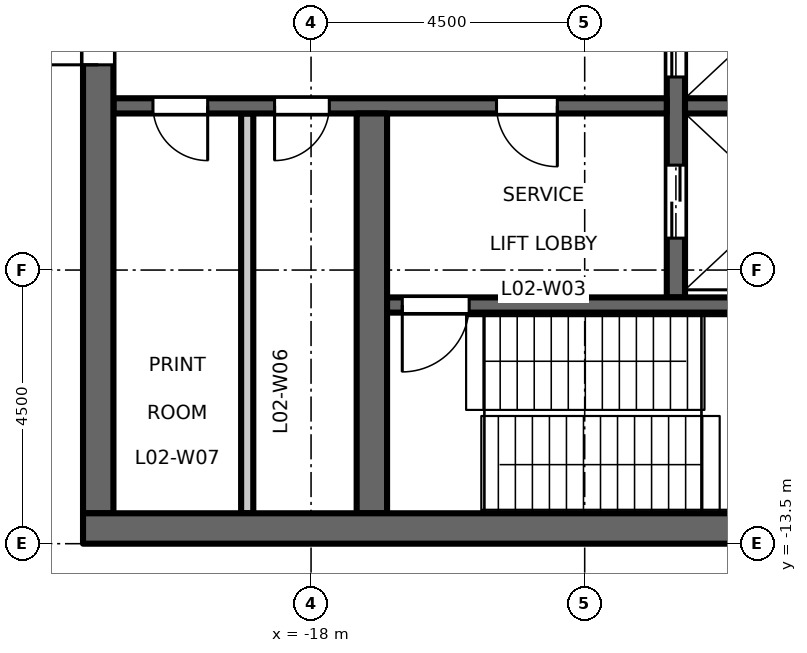
"""IFC4 building model, lengths in metres.
Left out: names, types, materials, properties, quantities, classifications, styles, units other than length and angle.
Written with IfcOpenShell. Run it as: python <this file> out.ifc"""

import sys

from ifc_helpers import new_model, si_unit, direction, frame, frame_2d, origin, place, context, subcontext, project, spatial, rectangle, extrude, element, fill, save


model = new_model("IFC4")
c1 = context("Model", 3, precision=1e-05, world=origin(), true_north=direction((0.0, 1.0)))
c2 = subcontext(c1, "Body", "Model", "MODEL_VIEW")
j1 = project(units=[si_unit("LENGTHUNIT", "METRE"), si_unit("PLANEANGLEUNIT", "RADIAN")], contexts=[c1])
p1 = place(None, origin())
s1 = spatial("IfcSite", under=j1, at=p1, CompositionType="ELEMENT")
p2 = place(p1, origin())
s2 = spatial("IfcBuilding", under=s1, at=p2, CompositionType="ELEMENT")
p3 = place(p2, frame((0.0, 0.0, 12.2)))
s3 = spatial("IfcBuildingStorey", under=s2, at=p3, CompositionType="ELEMENT", Elevation=12.2)
p4 = place(p3, frame((-12.0, -9.45, 0.0), z_axis=(0.0, 0.0, 1.0), x_axis=(0.0, 1.0, 0.0)))
e1 = element("IfcWall", 1, at=p4, inside=s3, PredefinedType="SHEAR", context=c2, shape_type="SweptSolid", body=[
    extrude(rectangle(XDim=18.9, YDim=0.3, at=frame_2d((9.45, 0.0))), origin(), (0.0, 0.0, 1.0), 4.85),
])
p5 = place(p4, frame((3.625, 0.0, 0.0)))
e2 = element("IfcOpeningElement", 2, at=p5, cuts=e1, PredefinedType="OPENING", context=c2, shape_type="SweptSolid", body=[
    extrude(rectangle(XDim=1.1, YDim=2.1, at=frame_2d((0.55, 1.05))), frame((0.0, 0.16, 0.0), z_axis=(0.0, -1.0, 0.0), x_axis=(1.0, 0.0, 0.0)), (0.0, 0.0, 1.0), 0.32),
])
p6 = place(p4, frame((6.775, 0.0, 0.0)))
e3 = element("IfcOpeningElement", 3, at=p6, cuts=e1, PredefinedType="OPENING", context=c2, shape_type="SweptSolid", body=[
    extrude(rectangle(XDim=1.1, YDim=2.1, at=frame_2d((0.55, 1.05))), frame((0.0, 0.16, 0.0), z_axis=(0.0, -1.0, 0.0), x_axis=(1.0, 0.0, 0.0)), (0.0, 0.0, 1.0), 0.32),
])
p7 = place(p4, frame((9.925, 0.0, 0.0)))
e4 = element("IfcOpeningElement", 4, at=p7, cuts=e1, PredefinedType="OPENING", context=c2, shape_type="SweptSolid", body=[
    extrude(rectangle(XDim=1.1, YDim=2.1, at=frame_2d((0.55, 1.05))), frame((0.0, 0.16, 0.0), z_axis=(0.0, -1.0, 0.0), x_axis=(1.0, 0.0, 0.0)), (0.0, 0.0, 1.0), 0.32),
])
p8 = place(p4, frame((13.075, 0.0, 0.0)))
e5 = element("IfcOpeningElement", 5, at=p8, cuts=e1, PredefinedType="OPENING", context=c2, shape_type="SweptSolid", body=[
    extrude(rectangle(XDim=1.1, YDim=2.1, at=frame_2d((0.55, 1.05))), frame((0.0, 0.16, 0.0), z_axis=(0.0, -1.0, 0.0), x_axis=(1.0, 0.0, 0.0)), (0.0, 0.0, 1.0), 0.32),
])
p9 = place(p4, frame((16.725, 0.0, 0.0)))
e6 = element("IfcOpeningElement", 6, at=p9, cuts=e1, PredefinedType="OPENING", context=c2, shape_type="SweptSolid", body=[
    extrude(rectangle(XDim=1.2, YDim=2.1, at=frame_2d((0.6, 1.05))), frame((0.0, 0.16, 0.0), z_axis=(0.0, -1.0, 0.0), x_axis=(1.0, 0.0, 0.0)), (0.0, 0.0, 1.0), 0.32),
])
p10 = place(p4, frame((0.975, 0.0, 0.0)))
e7 = element("IfcOpeningElement", 7, at=p10, cuts=e1, PredefinedType="OPENING", context=c2, shape_type="SweptSolid", body=[
    extrude(rectangle(XDim=1.2, YDim=2.1, at=frame_2d((0.6, 1.05))), frame((0.0, 0.16, 0.0), z_axis=(0.0, -1.0, 0.0), x_axis=(1.0, 0.0, 0.0)), (0.0, 0.0, 1.0), 0.32),
])
p11 = place(p3, frame((-12.15, -6.3, 0.0), z_axis=(0.0, 0.0, 1.0), x_axis=(-1.0, 0.0, 0.0)))
e8 = element("IfcWall", 8, at=p11, inside=s3, PredefinedType="SHEAR", context=c2, shape_type="SweptSolid", body=[
    extrude(rectangle(XDim=9.1, YDim=0.25, at=frame_2d((4.55, 0.0))), origin(), (0.0, 0.0, 1.0), 4.85),
])
p12 = place(p11, frame((1.8, 0.0, 0.0)))
e9 = element("IfcOpeningElement", 9, at=p12, cuts=e8, PredefinedType="OPENING", context=c2, shape_type="SweptSolid", body=[
    extrude(rectangle(XDim=1.0, YDim=2.1, at=frame_2d((0.5, 1.05))), frame((0.0, 0.135, 0.0), z_axis=(0.0, -1.0, 0.0), x_axis=(1.0, 0.0, 0.0)), (0.0, 0.0, 1.0), 0.27),
])
p13 = place(p11, frame((5.55, 0.0, 0.0)))
e10 = element("IfcOpeningElement", 10, at=p13, cuts=e8, PredefinedType="OPENING", context=c2, shape_type="SweptSolid", body=[
    extrude(rectangle(XDim=0.9, YDim=2.1, at=frame_2d((0.45, 1.05))), frame((0.0, 0.135, 0.0), z_axis=(0.0, -1.0, 0.0), x_axis=(1.0, 0.0, 0.0)), (0.0, 0.0, 1.0), 0.27),
])
p14 = place(p11, frame((7.55, 0.0, 0.0)))
e11 = element("IfcOpeningElement", 11, at=p14, cuts=e8, PredefinedType="OPENING", context=c2, shape_type="SweptSolid", body=[
    extrude(rectangle(XDim=0.9, YDim=2.1, at=frame_2d((0.45, 1.05))), frame((0.0, 0.135, 0.0), z_axis=(0.0, -1.0, 0.0), x_axis=(1.0, 0.0, 0.0)), (0.0, 0.0, 1.0), 0.27),
])
p15 = place(p3, frame((-21.5, -13.0, 0.0), z_axis=(0.0, 0.0, 1.0), x_axis=(0.0, 1.0, 0.0)))
e12 = element("IfcWall", 12, at=p15, inside=s3, PredefinedType="SHEAR", context=c2, shape_type="SweptSolid", body=[
    extrude(rectangle(XDim=26.0, YDim=0.5, at=frame_2d((13.0, 0.0))), origin(), (0.0, 0.0, 1.0), 4.85),
])
p16 = place(p15, frame((16.825, 0.0, 0.0)))
e13 = element("IfcOpeningElement", 13, at=p16, cuts=e12, PredefinedType="OPENING", context=c2, shape_type="SweptSolid", body=[
    extrude(rectangle(XDim=1.8, YDim=2.1, at=frame_2d((0.9, 1.05))), frame((0.0, 0.26, 0.0), z_axis=(0.0, -1.0, 0.0), x_axis=(1.0, 0.0, 0.0)), (0.0, 0.0, 1.0), 0.52),
])
p17 = place(p15, frame((7.375, 0.0, 0.0)))
e14 = element("IfcOpeningElement", 14, at=p17, cuts=e12, PredefinedType="OPENING", context=c2, shape_type="SweptSolid", body=[
    extrude(rectangle(XDim=1.8, YDim=2.1, at=frame_2d((0.9, 1.05))), frame((0.0, 0.26, 0.0), z_axis=(0.0, -1.0, 0.0), x_axis=(1.0, 0.0, 0.0)), (0.0, 0.0, 1.0), 0.52),
])
p18 = place(p15, frame((23.8, 0.0, 0.0)))
e15 = element("IfcOpeningElement", 15, at=p18, cuts=e12, PredefinedType="OPENING", context=c2, shape_type="SweptSolid", body=[
    extrude(rectangle(XDim=0.9, YDim=2.1, at=frame_2d((0.45, 1.05))), frame((0.0, 0.26, 0.0), z_axis=(0.0, -1.0, 0.0), x_axis=(1.0, 0.0, 0.0)), (0.0, 0.0, 1.0), 0.52),
])
p19 = place(p3, frame((-19.05, -13.0, 0.0), z_axis=(0.0, 0.0, 1.0), x_axis=(0.0, 1.0, 0.0)))
e16 = element("IfcWall", 16, at=p19, inside=s3, PredefinedType="PARTITIONING", context=c2, shape_type="SweptSolid", body=[
    extrude(rectangle(XDim=6.575, YDim=0.2, at=frame_2d((3.288, 0.0))), origin(), (0.0, 0.0, 1.0), 4.85),
])
p20 = place(p3, frame((-17.0, -13.0, 0.0), z_axis=(0.0, 0.0, 1.0), x_axis=(0.0, 1.0, 0.0)))
e17 = element("IfcWall", 17, at=p20, inside=s3, PredefinedType="SHEAR", context=c2, shape_type="SweptSolid", body=[
    extrude(rectangle(XDim=6.575, YDim=0.5, at=frame_2d((3.288, 0.0))), origin(), (0.0, 0.0, 1.0), 4.85),
])
p21 = place(p3, frame((-8.75, -6.3, 0.0), z_axis=(0.0, 0.0, 1.0), x_axis=(-1.0, 0.0, 0.0)))
e18 = element("IfcWall", 18, at=p21, inside=s3, PredefinedType="SHEAR", context=c2, shape_type="SweptSolid", body=[
    extrude(rectangle(XDim=3.1, YDim=0.25, at=frame_2d((1.55, 0.0))), origin(), (0.0, 0.0, 1.0), 4.85),
])
p22 = place(p3, frame((-8.75, -9.575, 0.0), z_axis=(0.0, 0.0, 1.0), x_axis=(-1.0, 0.0, 0.0)))
e19 = element("IfcWall", 19, at=p22, inside=s3, PredefinedType="SHEAR", context=c2, shape_type="SweptSolid", body=[
    extrude(rectangle(XDim=8.0, YDim=0.25, at=frame_2d((4.0, 0.0))), origin(), (0.0, 0.0, 1.0), 4.85),
])
p23 = place(p22, frame((6.65, 0.0, 0.0)))
e20 = element("IfcOpeningElement", 20, at=p23, cuts=e19, PredefinedType="OPENING", context=c2, shape_type="SweptSolid", body=[
    extrude(rectangle(XDim=1.1, YDim=2.1, at=frame_2d((0.55, 1.05))), frame((0.0, 0.135, 0.0), z_axis=(0.0, -1.0, 0.0), x_axis=(1.0, 0.0, 0.0)), (0.0, 0.0, 1.0), 0.27),
])
p24 = place(p3, frame((-8.25, -13.25, 0.0), z_axis=(0.0, 0.0, 1.0), x_axis=(-1.0, 0.0, 0.0)))
e21 = element("IfcWall", 21, at=p24, inside=s3, PredefinedType="SHEAR", context=c2, shape_type="SweptSolid", body=[
    extrude(rectangle(XDim=13.5, YDim=0.5, at=frame_2d((6.75, 0.0))), origin(), (0.0, 0.0, 1.0), 4.85),
])
p25 = place(p12, origin())
e22 = element("IfcDoor", 22, at=p25, inside=s3, OperationType="SINGLE_SWING_RIGHT", PredefinedType="DOOR", context=c2, shape_type="SweptSolid", body=[
    extrude(rectangle(XDim=1.0, YDim=2.1, at=frame_2d((0.5, 1.05))), frame((0.0, 0.025, 0.0), z_axis=(0.0, -1.0, 0.0), x_axis=(1.0, 0.0, 0.0)), (0.0, 0.0, 1.0), 0.05),
])
fill(e9, e22)
p26 = place(p23, origin())
e23 = element("IfcDoor", 23, at=p26, inside=s3, OperationType="SINGLE_SWING_LEFT", PredefinedType="DOOR", context=c2, shape_type="SweptSolid", body=[
    extrude(rectangle(XDim=1.1, YDim=2.1, at=frame_2d((0.55, 1.05))), frame((0.0, 0.025, 0.0), z_axis=(0.0, -1.0, 0.0), x_axis=(1.0, 0.0, 0.0)), (0.0, 0.0, 1.0), 0.05),
])
fill(e20, e23)
p27 = place(p17, origin())
e24 = element("IfcDoor", 24, at=p27, inside=s3, OperationType="DOUBLE_DOOR_DOUBLE_SWING", PredefinedType="DOOR", context=c2, shape_type="SweptSolid", body=[
    extrude(rectangle(XDim=1.8, YDim=2.1, at=frame_2d((0.9, 1.05))), frame((0.0, 0.025, 0.0), z_axis=(0.0, -1.0, 0.0), x_axis=(1.0, 0.0, 0.0)), (0.0, 0.0, 1.0), 0.05),
])
fill(e14, e24)
p28 = place(p5, origin())
e25 = element("IfcDoor", 25, at=p28, inside=s3, OperationType="DOUBLE_DOOR_SLIDING", PredefinedType="DOOR", context=c2, shape_type="SweptSolid", body=[
    extrude(rectangle(XDim=1.1, YDim=2.1, at=frame_2d((0.55, 1.05))), frame((0.0, 0.025, 0.0), z_axis=(0.0, -1.0, 0.0), x_axis=(1.0, 0.0, 0.0)), (0.0, 0.0, 1.0), 0.05),
])
fill(e2, e25)
p29 = place(p10, origin())
e26 = element("IfcDoor", 26, at=p29, inside=s3, OperationType="DOUBLE_DOOR_SLIDING", PredefinedType="DOOR", context=c2, shape_type="SweptSolid", body=[
    extrude(rectangle(XDim=1.2, YDim=2.1, at=frame_2d((0.6, 1.05))), frame((0.0, 0.025, 0.0), z_axis=(0.0, -1.0, 0.0), x_axis=(1.0, 0.0, 0.0)), (0.0, 0.0, 1.0), 0.05),
])
fill(e7, e26)
p30 = place(p13, origin())
e27 = element("IfcDoor", 27, at=p30, inside=s3, OperationType="SINGLE_SWING_LEFT", PredefinedType="DOOR", context=c2, shape_type="SweptSolid", body=[
    extrude(rectangle(XDim=0.9, YDim=2.1, at=frame_2d((0.45, 1.05))), frame((0.0, 0.025, 0.0), z_axis=(0.0, -1.0, 0.0), x_axis=(1.0, 0.0, 0.0)), (0.0, 0.0, 1.0), 0.05),
])
fill(e10, e27)
p31 = place(p14, origin())
e28 = element("IfcDoor", 28, at=p31, inside=s3, OperationType="SINGLE_SWING_RIGHT", PredefinedType="DOOR", context=c2, shape_type="SweptSolid", body=[
    extrude(rectangle(XDim=0.9, YDim=2.1, at=frame_2d((0.45, 1.05))), frame((0.0, 0.025, 0.0), z_axis=(0.0, -1.0, 0.0), x_axis=(1.0, 0.0, 0.0)), (0.0, 0.0, 1.0), 0.05),
])
fill(e11, e28)
save(model, sys.argv[1])
